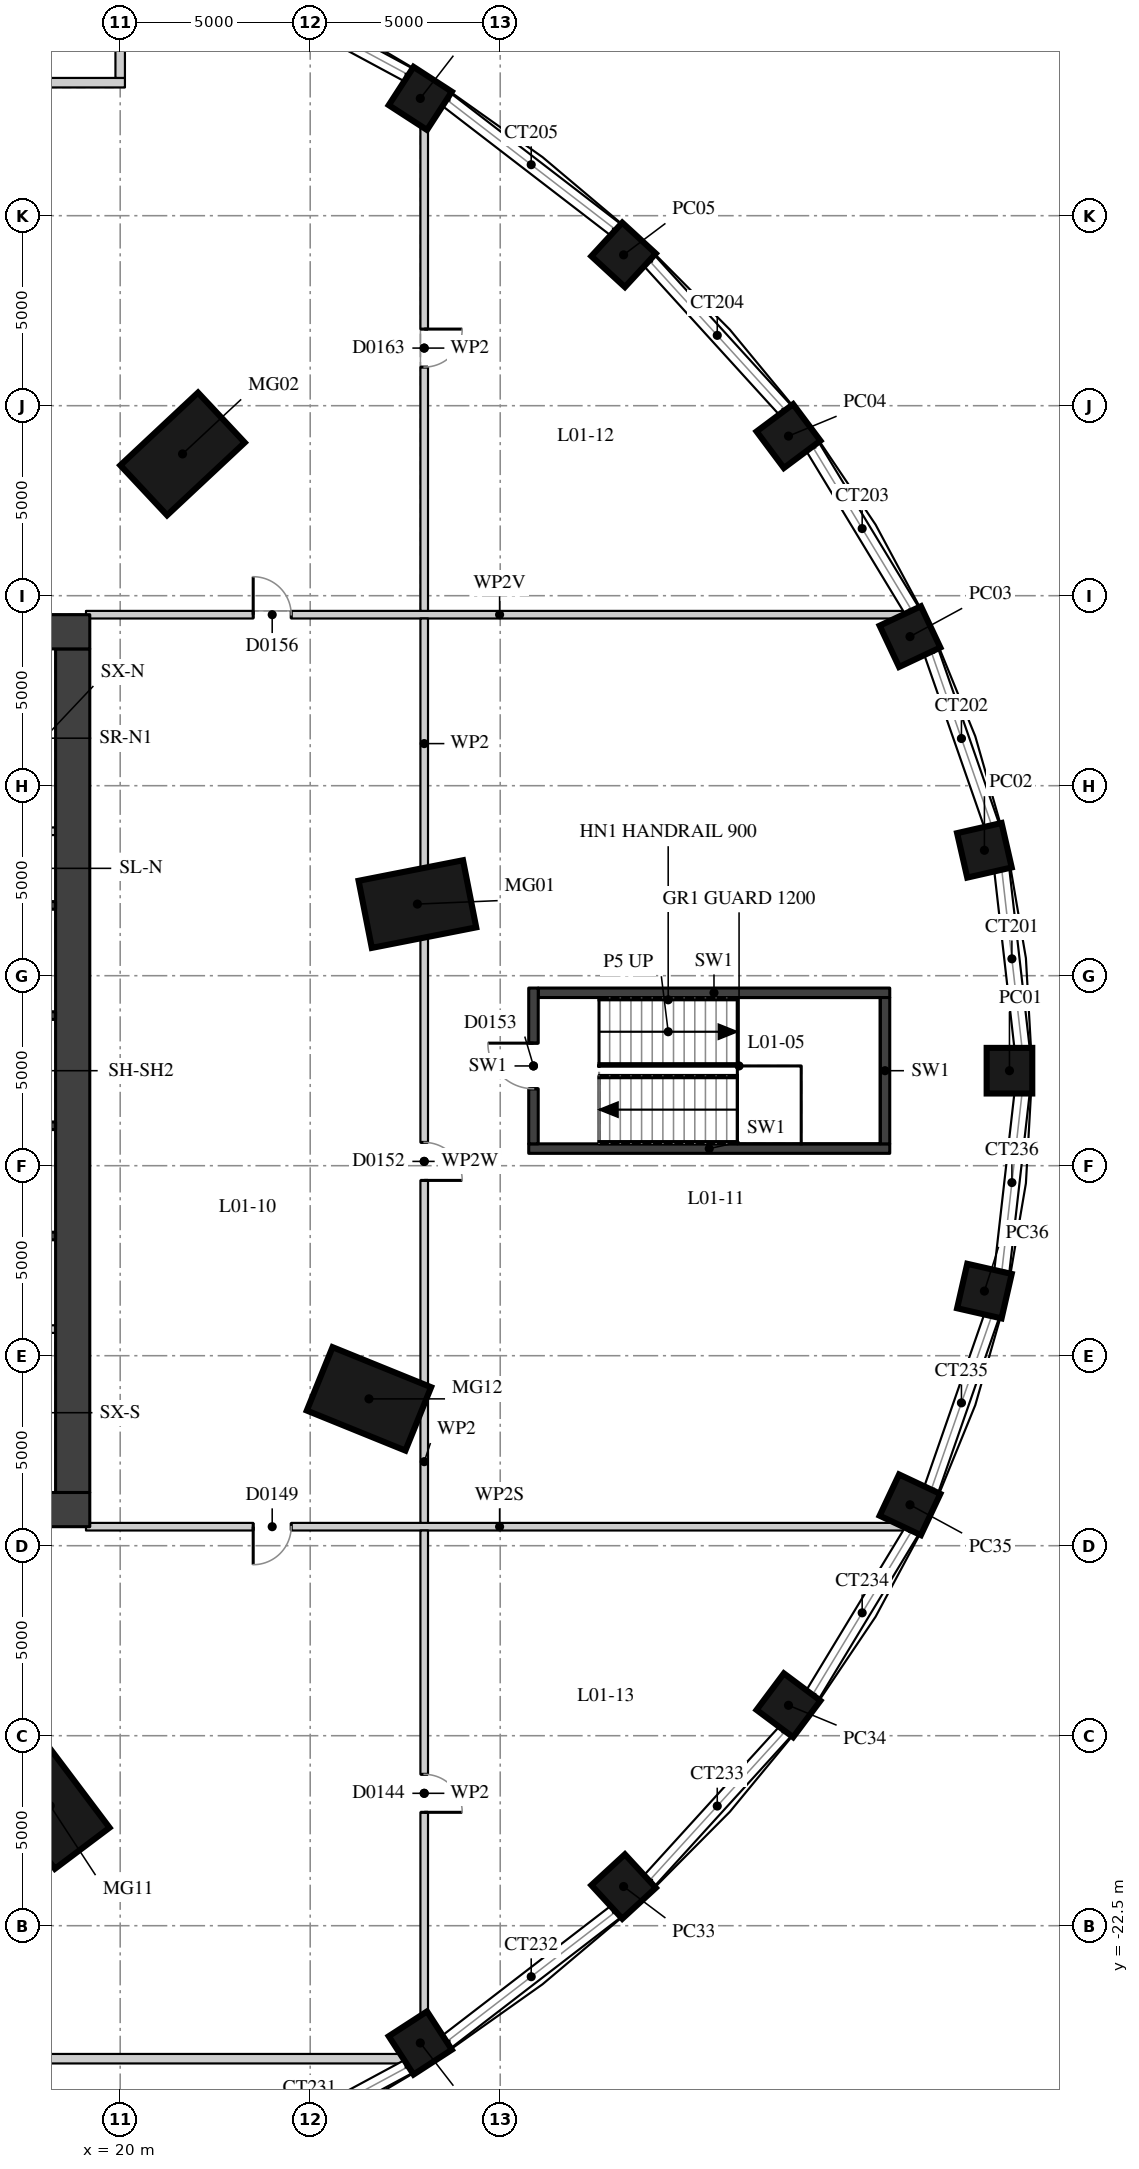
"""IFC4 building model, lengths in metres.
Left out: names, types, materials, properties, quantities, classifications, styles, units other than length and angle.
Written with IfcOpenShell. Run it as: python <this file> out.ifc"""

import sys

from ifc_helpers import new_model, si_unit, direction, frame, frame_2d, origin, origin_2d, place, context, subcontext, project, spatial, rectangle, extrude, element, fill, save


model = new_model("IFC4")
c1 = context("Model", 3, precision=1e-05, world=origin(), true_north=direction((0.0, 1.0)))
c2 = subcontext(c1, "Body", "Model", "MODEL_VIEW")
j1 = project(units=[si_unit("LENGTHUNIT", "METRE"), si_unit("PLANEANGLEUNIT", "RADIAN")], contexts=[c1])
p1 = place(None, origin())
s1 = spatial("IfcSite", under=j1, at=p1, CompositionType="ELEMENT")
p2 = place(p1, origin())
s2 = spatial("IfcBuilding", under=s1, at=p2, CompositionType="ELEMENT")
p3 = place(p2, frame((0.0, 0.0, 7.5)))
s3 = spatial("IfcBuildingStorey", under=s2, at=p3, CompositionType="ELEMENT", Elevation=7.5)
for number, where, z_axis, x_axis in (
    (1, (27.821, 4.385, 0.0), (0.0, 0.0, 1.0), (0.981, 0.193, 0.0)),
    (2, (21.641, 16.23, 0.0), (0.0, 0.0, 1.0), (0.73, 0.683, 0.0)),
    (3, (18.159, -19.343, 0.0), (0.0, 0.0, 1.0), (0.601, -0.799, 0.0)),
    (4, (26.546, -8.636, 0.0), (0.0, 0.0, 1.0), (0.927, -0.376, 0.0)),
):
    element("IfcColumn", number, at=place(p3, frame(where, z_axis=z_axis, x_axis=x_axis)), inside=s3, PredefinedType="COLUMN", context=c2, shape_type="SweptSolid", body=[
        extrude(rectangle(XDim=2.8, YDim=1.8, at=origin_2d()), origin(), (0.0, 0.0, 1.0), 5.0),
    ])
for number, where, z_axis, x_axis in (
    (5, (43.4, 0.0, 0.0), (0.0, 0.0, 1.0), (1.0, 0.0, 0.0)),
    (6, (42.741, 5.8, 0.0), (0.0, 0.0, 1.0), (0.975, 0.222, 0.0)),
    (7, (40.783, 11.424, 0.0), (0.0, 0.0, 1.0), (0.905, 0.426, 0.0)),
    (8, (37.585, 16.7, 0.0), (0.0, 0.0, 1.0), (0.801, 0.599, 0.0)),
    (9, (33.246, 21.469, 0.0), (0.0, 0.0, 1.0), (0.677, 0.736, 0.0)),
    (10, (27.897, 25.586, 0.0), (0.0, 0.0, 1.0), (0.544, 0.839, 0.0)),
    (11, (27.897, -25.586, 0.0), (0.0, 0.0, 1.0), (0.544, -0.839, 0.0)),
    (12, (33.246, -21.469, 0.0), (0.0, 0.0, 1.0), (0.677, -0.736, 0.0)),
    (13, (37.585, -16.7, 0.0), (0.0, 0.0, 1.0), (0.801, -0.599, 0.0)),
    (14, (40.783, -11.424, 0.0), (0.0, 0.0, 1.0), (0.905, -0.426, 0.0)),
    (15, (42.741, -5.8, 0.0), (0.0, 0.0, 1.0), (0.975, -0.222, 0.0)),
):
    element("IfcColumn", number, at=place(p3, frame(where, z_axis=z_axis, x_axis=x_axis)), inside=s3, PredefinedType="COLUMN", context=c2, shape_type="SweptSolid", body=[
        extrude(rectangle(XDim=1.2, YDim=1.2, at=origin_2d()), origin(), (0.0, 0.0, 1.0), 5.0),
    ])
p4 = place(p3, frame((18.75, -11.1, 0.0), z_axis=(0.0, 0.0, 1.0), x_axis=(0.0, 1.0, 0.0)))
e16 = element("IfcWall", 16, at=p4, inside=s3, PredefinedType="SHEAR", context=c2, shape_type="SweptSolid", body=[
    extrude(rectangle(XDim=22.2, YDim=0.9, at=frame_2d((11.1, 0.0))), origin(), (0.0, 0.0, 1.0), 4.59),
])
for number, where, z_axis, x_axis in (
    (17, (4.0, 11.55, 0.0), (0.0, 0.0, 1.0), (1.0, 0.0, 0.0)),
    (18, (4.0, -11.55, 0.0), (0.0, 0.0, 1.0), (1.0, 0.0, 0.0)),
):
    element("IfcWall", number, at=place(p3, frame(where, z_axis=z_axis, x_axis=x_axis)), inside=s3, PredefinedType="SHEAR", context=c2, shape_type="SweptSolid", body=[
        extrude(rectangle(XDim=15.2, YDim=0.9, at=frame_2d((7.6, 0.0))), origin(), (0.0, 0.0, 1.0), 4.59),
    ])
for number, where, z_axis, x_axis in (
    (19, (16.0, -4.35, 0.0), (0.0, 0.0, 1.0), (1.0, 0.0, 0.0)),
    (20, (16.0, -1.45, 0.0), (0.0, 0.0, 1.0), (1.0, 0.0, 0.0)),
    (21, (16.0, 1.45, 0.0), (0.0, 0.0, 1.0), (1.0, 0.0, 0.0)),
    (22, (16.0, 4.35, 0.0), (0.0, 0.0, 1.0), (1.0, 0.0, 0.0)),
):
    element("IfcWall", number, at=place(p3, frame(where, z_axis=z_axis, x_axis=x_axis)), inside=s3, PredefinedType="SHEAR", context=c2, shape_type="SweptSolid", body=[
        extrude(rectangle(XDim=2.3, YDim=0.2, at=frame_2d((1.15, 0.0))), origin(), (0.0, 0.0, 1.0), 4.59),
    ])
p5 = place(p3, frame((16.0, 6.3, 0.0), z_axis=(0.0, 0.0, 1.0), x_axis=(1.0, 0.0, 0.0)))
e23 = element("IfcWall", 23, at=p5, inside=s3, PredefinedType="PARTITIONING", context=c2, shape_type="SweptSolid", body=[
    extrude(rectangle(XDim=2.3, YDim=0.2, at=frame_2d((1.15, 0.0))), origin(), (0.0, 0.0, 1.0), 4.59),
])
p6 = place(p5, frame((0.3, 0.0, 0.0)))
e24 = element("IfcOpeningElement", 24, at=p6, cuts=e23, PredefinedType="OPENING", context=c2, shape_type="SweptSolid", body=[
    extrude(rectangle(XDim=0.9, YDim=2.1, at=frame_2d((0.45, 1.05))), frame((0.0, 0.11, 0.0), z_axis=(0.0, -1.0, 0.0), x_axis=(1.0, 0.0, 0.0)), (0.0, 0.0, 1.0), 0.22),
])
p7 = place(p3, frame((16.0, -6.8, 0.0), z_axis=(0.0, 0.0, 1.0), x_axis=(1.0, 0.0, 0.0)))
e25 = element("IfcWall", 25, at=p7, inside=s3, PredefinedType="PARTITIONING", context=c2, shape_type="SweptSolid", body=[
    extrude(rectangle(XDim=2.3, YDim=0.2, at=frame_2d((1.15, 0.0))), origin(), (0.0, 0.0, 1.0), 4.59),
])
p8 = place(p7, frame((0.2, 0.0, 0.0)))
e26 = element("IfcOpeningElement", 26, at=p8, cuts=e25, PredefinedType="OPENING", context=c2, shape_type="SweptSolid", body=[
    extrude(rectangle(XDim=0.9, YDim=2.1, at=frame_2d((0.45, 1.05))), frame((0.0, 0.11, 0.0), z_axis=(0.0, -1.0, 0.0), x_axis=(1.0, 0.0, 0.0)), (0.0, 0.0, 1.0), 0.22),
])
p9 = place(p3, frame((5.897, -26.0, 0.0), z_axis=(0.0, 0.0, 1.0), x_axis=(1.0, 0.0, 0.0)))
e27 = element("IfcWall", 27, at=p9, inside=s3, PredefinedType="PARTITIONING", context=c2, shape_type="SweptSolid", body=[
    extrude(rectangle(XDim=22.009, YDim=0.25, at=frame_2d((11.004, 0.0))), origin(), (0.0, 0.0, 1.0), 4.59),
])
p10 = place(p3, frame((19.1, -12.0, 0.0), z_axis=(0.0, 0.0, 1.0), x_axis=(1.0, 0.0, 0.0)))
e28 = element("IfcWall", 28, at=p10, inside=s3, PredefinedType="PARTITIONING", context=c2, shape_type="SweptSolid", body=[
    extrude(rectangle(XDim=21.767, YDim=0.2, at=frame_2d((10.883, 0.0))), origin(), (0.0, 0.0, 1.0), 3.69),
])
p11 = place(p10, frame((4.4, 0.0, 0.0)))
e29 = element("IfcOpeningElement", 29, at=p11, cuts=e28, PredefinedType="OPENING", context=c2, shape_type="SweptSolid", body=[
    extrude(rectangle(XDim=1.0, YDim=2.1, at=frame_2d((0.5, 1.05))), frame((0.0, 0.11, 0.0), z_axis=(0.0, -1.0, 0.0), x_axis=(1.0, 0.0, 0.0)), (0.0, 0.0, 1.0), 0.22),
])
p12 = place(p3, frame((30.75, -2.05, 0.0), z_axis=(0.0, 0.0, 1.0), x_axis=(1.0, 0.0, 0.0)))
e30 = element("IfcWall", 30, at=p12, inside=s3, PredefinedType="SOLIDWALL", context=c2, shape_type="SweptSolid", body=[
    extrude(rectangle(XDim=9.5, YDim=0.25, at=frame_2d((4.75, 0.0))), origin(), (0.0, 0.0, 1.0), 4.59),
])
p13 = place(p3, frame((31.0, 2.05, 0.0), z_axis=(0.0, 0.0, 1.0), x_axis=(1.0, 0.0, 0.0)))
e31 = element("IfcWall", 31, at=p13, inside=s3, PredefinedType="SOLIDWALL", context=c2, shape_type="SweptSolid", body=[
    extrude(rectangle(XDim=9.25, YDim=0.25, at=frame_2d((4.625, 0.0))), origin(), (0.0, 0.0, 1.0), 4.59),
])
p14 = place(p3, frame((19.1, 12.0, 0.0), z_axis=(0.0, 0.0, 1.0), x_axis=(1.0, 0.0, 0.0)))
e32 = element("IfcWall", 32, at=p14, inside=s3, PredefinedType="PARTITIONING", context=c2, shape_type="SweptSolid", body=[
    extrude(rectangle(XDim=21.767, YDim=0.2, at=frame_2d((10.883, 0.0))), origin(), (0.0, 0.0, 1.0), 3.59),
])
p15 = place(p14, frame((4.4, 0.0, 0.0)))
e33 = element("IfcOpeningElement", 33, at=p15, cuts=e32, PredefinedType="OPENING", context=c2, shape_type="SweptSolid", body=[
    extrude(rectangle(XDim=1.0, YDim=2.1, at=frame_2d((0.5, 1.05))), frame((0.0, 0.11, 0.0), z_axis=(0.0, -1.0, 0.0), x_axis=(1.0, 0.0, 0.0)), (0.0, 0.0, 1.0), 0.22),
])
p16 = place(p3, frame((3.875, 26.0, 0.0), z_axis=(0.0, 0.0, 1.0), x_axis=(1.0, 0.0, 0.0)))
e34 = element("IfcWall", 34, at=p16, inside=s3, PredefinedType="PARTITIONING", context=c2, shape_type="SweptSolid", body=[
    extrude(rectangle(XDim=16.25, YDim=0.25, at=frame_2d((8.125, 0.0))), origin(), (0.0, 0.0, 1.0), 4.59),
])
p17 = place(p16, frame((7.625, 0.0, 0.0)))
e35 = element("IfcOpeningElement", 35, at=p17, cuts=e34, PredefinedType="OPENING", context=c2, shape_type="SweptSolid", body=[
    extrude(rectangle(XDim=1.0, YDim=2.1, at=frame_2d((0.5, 1.05))), frame((0.0, 0.135, 0.0), z_axis=(0.0, -1.0, 0.0), x_axis=(1.0, 0.0, 0.0)), (0.0, 0.0, 1.0), 0.27),
])
p18 = place(p3, frame((20.0, 26.125, 0.0), z_axis=(0.0, 0.0, 1.0), x_axis=(0.0, 1.0, 0.0)))
e36 = element("IfcWall", 36, at=p18, inside=s3, PredefinedType="PARTITIONING", context=c2, shape_type="SweptSolid", body=[
    extrude(rectangle(XDim=3.856, YDim=0.25, at=frame_2d((1.928, 0.0))), origin(), (0.0, 0.0, 1.0), 4.59),
])
p19 = place(p3, frame((28.0, -25.932, 0.0), z_axis=(0.0, 0.0, 1.0), x_axis=(0.0, 1.0, 0.0)))
e37 = element("IfcWall", 37, at=p19, inside=s3, PredefinedType="PARTITIONING", context=c2, shape_type="SweptSolid", body=[
    extrude(rectangle(XDim=13.832, YDim=0.2, at=frame_2d((6.916, 0.0))), origin(), (0.0, 0.0, 1.0), 4.59),
])
p20 = place(p19, frame((6.416, 0.0, 0.0)))
e38 = element("IfcOpeningElement", 38, at=p20, cuts=e37, PredefinedType="OPENING", context=c2, shape_type="SweptSolid", body=[
    extrude(rectangle(XDim=1.0, YDim=2.1, at=frame_2d((0.5, 1.05))), frame((0.0, 0.11, 0.0), z_axis=(0.0, -1.0, 0.0), x_axis=(1.0, 0.0, 0.0)), (0.0, 0.0, 1.0), 0.22),
])
p21 = place(p3, frame((28.0, -11.9, 0.0), z_axis=(0.0, 0.0, 1.0), x_axis=(0.0, 1.0, 0.0)))
e39 = element("IfcWall", 39, at=p21, inside=s3, PredefinedType="PARTITIONING", context=c2, shape_type="SweptSolid", body=[
    extrude(rectangle(XDim=3.223, YDim=0.2, at=frame_2d((1.611, 0.0))), origin(), (0.0, 0.0, 1.0), 4.59),
])
p22 = place(p3, frame((28.0, -8.298, 0.0), z_axis=(0.0, 0.0, 1.0), x_axis=(0.0, 1.0, 0.0)))
e40 = element("IfcWall", 40, at=p22, inside=s3, PredefinedType="PARTITIONING", context=c2, shape_type="SweptSolid", body=[
    extrude(rectangle(XDim=11.822, YDim=0.2, at=frame_2d((5.911, 0.0))), origin(), (0.0, 0.0, 1.0), 3.44),
])
p23 = place(p22, frame((5.411, 0.0, 0.0)))
e41 = element("IfcOpeningElement", 41, at=p23, cuts=e40, PredefinedType="OPENING", context=c2, shape_type="SweptSolid", body=[
    extrude(rectangle(XDim=1.0, YDim=2.1, at=frame_2d((0.5, 1.05))), frame((0.0, 0.11, 0.0), z_axis=(0.0, -1.0, 0.0), x_axis=(1.0, 0.0, 0.0)), (0.0, 0.0, 1.0), 0.22),
])
p24 = place(p3, frame((28.0, 5.315, 0.0), z_axis=(0.0, 0.0, 1.0), x_axis=(0.0, 1.0, 0.0)))
e42 = element("IfcWall", 42, at=p24, inside=s3, PredefinedType="PARTITIONING", context=c2, shape_type="SweptSolid", body=[
    extrude(rectangle(XDim=6.584, YDim=0.2, at=frame_2d((3.292, 0.0))), origin(), (0.0, 0.0, 1.0), 4.59),
])
p25 = place(p3, frame((28.0, 12.1, 0.0), z_axis=(0.0, 0.0, 1.0), x_axis=(0.0, 1.0, 0.0)))
e43 = element("IfcWall", 43, at=p25, inside=s3, PredefinedType="PARTITIONING", context=c2, shape_type="SweptSolid", body=[
    extrude(rectangle(XDim=13.832, YDim=0.2, at=frame_2d((6.916, 0.0))), origin(), (0.0, 0.0, 1.0), 4.59),
])
p26 = place(p25, frame((6.416, 0.0, 0.0)))
e44 = element("IfcOpeningElement", 44, at=p26, cuts=e43, PredefinedType="OPENING", context=c2, shape_type="SweptSolid", body=[
    extrude(rectangle(XDim=1.0, YDim=2.1, at=frame_2d((0.5, 1.05))), frame((0.0, 0.11, 0.0), z_axis=(0.0, -1.0, 0.0), x_axis=(1.0, 0.0, 0.0)), (0.0, 0.0, 1.0), 0.22),
])
p27 = place(p3, frame((30.875, -1.925, 0.0), z_axis=(0.0, 0.0, 1.0), x_axis=(0.0, 1.0, 0.0)))
e45 = element("IfcWall", 45, at=p27, inside=s3, PredefinedType="SOLIDWALL", context=c2, shape_type="SweptSolid", body=[
    extrude(rectangle(XDim=4.1, YDim=0.25, at=frame_2d((2.05, 0.0))), origin(), (0.0, 0.0, 1.0), 4.59),
])
p28 = place(p27, frame((1.45, 0.0, 0.0)))
e46 = element("IfcOpeningElement", 46, at=p28, cuts=e45, PredefinedType="OPENING", context=c2, shape_type="SweptSolid", body=[
    extrude(rectangle(XDim=1.2, YDim=2.1, at=frame_2d((0.6, 1.05))), frame((0.0, 0.135, 0.0), z_axis=(0.0, -1.0, 0.0), x_axis=(1.0, 0.0, 0.0)), (0.0, 0.0, 1.0), 0.27),
])
p29 = place(p3, frame((40.125, -1.925, 0.0), z_axis=(0.0, 0.0, 1.0), x_axis=(0.0, 1.0, 0.0)))
e47 = element("IfcWall", 47, at=p29, inside=s3, PredefinedType="SOLIDWALL", context=c2, shape_type="SweptSolid", body=[
    extrude(rectangle(XDim=3.85, YDim=0.25, at=frame_2d((1.925, 0.0))), origin(), (0.0, 0.0, 1.0), 4.59),
])
p30 = place(p26, origin())
e48 = element("IfcDoor", 48, at=p30, inside=s3, OperationType="SINGLE_SWING_LEFT", PredefinedType="DOOR", context=c2, shape_type="SweptSolid", body=[
    extrude(rectangle(XDim=1.0, YDim=2.1, at=frame_2d((0.5, 1.05))), frame((0.0, 0.025, 0.0), z_axis=(0.0, -1.0, 0.0), x_axis=(1.0, 0.0, 0.0)), (0.0, 0.0, 1.0), 0.05),
])
fill(e44, e48)
p31 = place(p15, origin())
e49 = element("IfcDoor", 49, at=p31, inside=s3, OperationType="SINGLE_SWING_LEFT", PredefinedType="DOOR", context=c2, shape_type="SweptSolid", body=[
    extrude(rectangle(XDim=1.0, YDim=2.1, at=frame_2d((0.5, 1.05))), frame((0.0, 0.025, 0.0), z_axis=(0.0, -1.0, 0.0), x_axis=(1.0, 0.0, 0.0)), (0.0, 0.0, 1.0), 0.05),
])
fill(e33, e49)
p32 = place(p11, origin())
e50 = element("IfcDoor", 50, at=p32, inside=s3, OperationType="SINGLE_SWING_RIGHT", PredefinedType="DOOR", context=c2, shape_type="SweptSolid", body=[
    extrude(rectangle(XDim=1.0, YDim=2.1, at=frame_2d((0.5, 1.05))), frame((0.0, 0.025, 0.0), z_axis=(0.0, -1.0, 0.0), x_axis=(1.0, 0.0, 0.0)), (0.0, 0.0, 1.0), 0.05),
])
fill(e29, e50)
p33 = place(p23, origin())
e51 = element("IfcDoor", 51, at=p33, inside=s3, OperationType="SINGLE_SWING_RIGHT", PredefinedType="DOOR", context=c2, shape_type="SweptSolid", body=[
    extrude(rectangle(XDim=1.0, YDim=2.1, at=frame_2d((0.5, 1.05))), frame((0.0, 0.025, 0.0), z_axis=(0.0, -1.0, 0.0), x_axis=(1.0, 0.0, 0.0)), (0.0, 0.0, 1.0), 0.05),
])
fill(e41, e51)
p34 = place(p20, origin())
e52 = element("IfcDoor", 52, at=p34, inside=s3, OperationType="SINGLE_SWING_RIGHT", PredefinedType="DOOR", context=c2, shape_type="SweptSolid", body=[
    extrude(rectangle(XDim=1.0, YDim=2.1, at=frame_2d((0.5, 1.05))), frame((0.0, 0.025, 0.0), z_axis=(0.0, -1.0, 0.0), x_axis=(1.0, 0.0, 0.0)), (0.0, 0.0, 1.0), 0.05),
])
fill(e38, e52)
p35 = place(p28, origin())
e53 = element("IfcDoor", 53, at=p35, inside=s3, OperationType="SINGLE_SWING_RIGHT", PredefinedType="DOOR", context=c2, shape_type="SweptSolid", body=[
    extrude(rectangle(XDim=1.2, YDim=2.1, at=frame_2d((0.6, 1.05))), frame((0.0, 0.025, 0.0), z_axis=(0.0, -1.0, 0.0), x_axis=(1.0, 0.0, 0.0)), (0.0, 0.0, 1.0), 0.05),
])
fill(e46, e53)
save(model, sys.argv[1])
